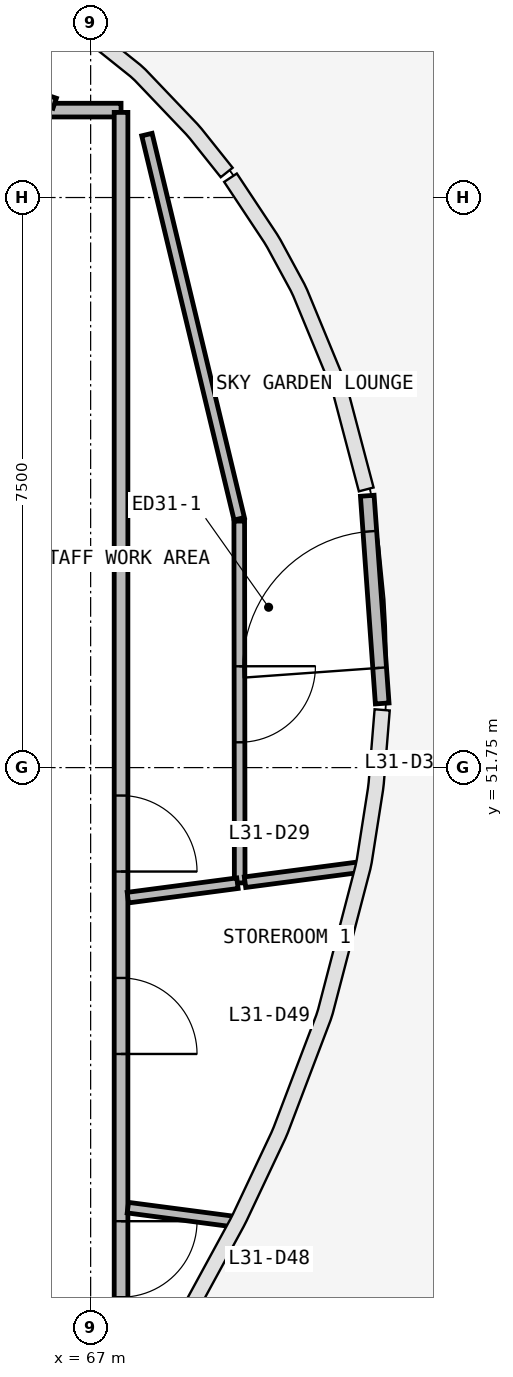
"""IFC4 building model, lengths in metres.
Left out: names, types, materials, properties, quantities, classifications, styles, units other than length and angle.
Written with IfcOpenShell. Run it as: python <this file> out.ifc"""

import sys

from ifc_helpers import new_model, si_unit, direction, frame, frame_2d, origin, place, context, subcontext, project, spatial, rectangle, extrude, source, transform, mapped, element, fill, save


model = new_model("IFC4")
c1 = context("Model", 3, precision=1e-05, world=origin(), true_north=direction((0.0, 1.0)))
c2 = subcontext(c1, "Body", "Model", "MODEL_VIEW")
j1 = project(units=[si_unit("LENGTHUNIT", "METRE"), si_unit("PLANEANGLEUNIT", "RADIAN")], contexts=[c1])
p1 = place(None, origin())
s1 = spatial("IfcSite", under=j1, at=p1, CompositionType="ELEMENT")
p2 = place(p1, origin())
s2 = spatial("IfcBuilding", under=s1, at=p2, CompositionType="ELEMENT")
p3 = place(p2, frame((0.0, 0.0, 133.1)))
s3 = spatial("IfcBuildingStorey", under=s2, at=p3, CompositionType="ELEMENT", Elevation=133.1)
p4 = place(p3, frame((70.836, 52.594, 0.0), z_axis=(0.0, 0.0, 1.0), x_axis=(-0.071747420295, 0.997422832945, 0.0)))
e1 = element("IfcWall", 1, at=p4, inside=s3, PredefinedType="STANDARD", context=c2, shape_type="SweptSolid", body=[
    extrude(rectangle(XDim=2.739, YDim=0.18, at=frame_2d((1.37, 0.0))), origin(), (0.0, 0.0, 1.0), 3.58),
])
p5 = place(p4, frame((0.469, 0.0, 0.0)))
e2 = element("IfcOpeningElement", 2, at=p5, cuts=e1, PredefinedType="OPENING", context=c2, shape_type="SweptSolid", body=[
    extrude(rectangle(XDim=1.8, YDim=2.4, at=frame_2d((0.9, 1.2))), frame((0.0, 0.1, 0.0), z_axis=(0.0, -1.0, 0.0), x_axis=(1.0, 0.0, 0.0)), (0.0, 0.0, 1.0), 0.2),
])
p6 = place(p3, frame((36.6, 60.4, 0.0), z_axis=(0.0, 0.0, 1.0), x_axis=(1.0, 0.0, 0.0)))
e3 = element("IfcWall", 3, at=p6, inside=s3, PredefinedType="PARTITIONING", context=c2, shape_type="SweptSolid", body=[
    extrude(rectangle(XDim=30.8, YDim=0.18, at=frame_2d((15.4, 0.0))), origin(), (0.0, 0.0, 1.0), 2.88),
])
p7 = place(p6, frame((22.25, 0.0, 0.0)))
e4 = element("IfcOpeningElement", 4, at=p7, cuts=e3, PredefinedType="OPENING", context=c2, shape_type="SweptSolid", body=[
    extrude(rectangle(XDim=0.9, YDim=2.1, at=frame_2d((0.45, 1.05))), frame((0.0, 0.1, 0.0), z_axis=(0.0, -1.0, 0.0), x_axis=(1.0, 0.0, 0.0)), (0.0, 0.0, 1.0), 0.2),
])
p8 = place(p6, frame((19.65, 0.0, 0.0)))
e5 = element("IfcOpeningElement", 5, at=p8, cuts=e3, PredefinedType="OPENING", context=c2, shape_type="SweptSolid", body=[
    extrude(rectangle(XDim=0.9, YDim=2.1, at=frame_2d((0.45, 1.05))), frame((0.0, 0.1, 0.0), z_axis=(0.0, -1.0, 0.0), x_axis=(1.0, 0.0, 0.0)), (0.0, 0.0, 1.0), 0.2),
])
p9 = place(p6, frame((17.25, 0.0, 0.0)))
e6 = element("IfcOpeningElement", 6, at=p9, cuts=e3, PredefinedType="OPENING", context=c2, shape_type="SweptSolid", body=[
    extrude(rectangle(XDim=0.9, YDim=2.1, at=frame_2d((0.45, 1.05))), frame((0.0, 0.1, 0.0), z_axis=(0.0, -1.0, 0.0), x_axis=(1.0, 0.0, 0.0)), (0.0, 0.0, 1.0), 0.2),
])
p10 = place(p6, frame((14.95, 0.0, 0.0)))
e7 = element("IfcOpeningElement", 7, at=p10, cuts=e3, PredefinedType="OPENING", context=c2, shape_type="SweptSolid", body=[
    extrude(rectangle(XDim=1.0, YDim=2.1, at=frame_2d((0.5, 1.05))), frame((0.0, 0.1, 0.0), z_axis=(0.0, -1.0, 0.0), x_axis=(1.0, 0.0, 0.0)), (0.0, 0.0, 1.0), 0.2),
])
p11 = place(p6, frame((8.95, 0.0, 0.0)))
e8 = element("IfcOpeningElement", 8, at=p11, cuts=e3, PredefinedType="OPENING", context=c2, shape_type="SweptSolid", body=[
    extrude(rectangle(XDim=1.0, YDim=2.1, at=frame_2d((0.5, 1.05))), frame((0.0, 0.1, 0.0), z_axis=(0.0, -1.0, 0.0), x_axis=(1.0, 0.0, 0.0)), (0.0, 0.0, 1.0), 0.2),
])
p12 = place(p3, frame((67.4, 60.37, 0.0), z_axis=(0.0, 0.0, 1.0), x_axis=(0.0, -1.0, 0.0)))
e9 = element("IfcWall", 9, at=p12, inside=s3, PredefinedType="PARTITIONING", context=c2, shape_type="SweptSolid", body=[
    extrude(rectangle(XDim=23.638, YDim=0.18, at=frame_2d((11.819, 0.0))), origin(), (0.0, 0.0, 1.0), 2.88),
])
p13 = place(p12, frame((8.988, 0.0, 0.0)))
e10 = element("IfcOpeningElement", 10, at=p13, cuts=e9, PredefinedType="OPENING", context=c2, shape_type="SweptSolid", body=[
    extrude(rectangle(XDim=1.0, YDim=2.1, at=frame_2d((0.5, 1.05))), frame((0.0, 0.1, 0.0), z_axis=(0.0, -1.0, 0.0), x_axis=(1.0, 0.0, 0.0)), (0.0, 0.0, 1.0), 0.2),
])
p14 = place(p12, frame((14.587, 0.0, 0.0)))
e11 = element("IfcOpeningElement", 11, at=p14, cuts=e9, PredefinedType="OPENING", context=c2, shape_type="SweptSolid", body=[
    extrude(rectangle(XDim=1.0, YDim=2.1, at=frame_2d((0.5, 1.05))), frame((0.0, 0.1, 0.0), z_axis=(0.0, -1.0, 0.0), x_axis=(1.0, 0.0, 0.0)), (0.0, 0.0, 1.0), 0.2),
])
p15 = place(p12, frame((11.387, 0.0, 0.0)))
e12 = element("IfcOpeningElement", 12, at=p15, cuts=e9, PredefinedType="OPENING", context=c2, shape_type="SweptSolid", body=[
    extrude(rectangle(XDim=1.0, YDim=2.1, at=frame_2d((0.5, 1.05))), frame((0.0, 0.1, 0.0), z_axis=(0.0, -1.0, 0.0), x_axis=(1.0, 0.0, 0.0)), (0.0, 0.0, 1.0), 0.2),
])
p16 = place(p3, frame((68.955, 55.023, 0.0), z_axis=(0.0, 0.0, 1.0), x_axis=(-0.233630483272, 0.97232545852, 0.0)))
e13 = element("IfcWall", 13, at=p16, inside=s3, PredefinedType="PARTITIONING", context=c2, shape_type="SweptSolid", body=[
    extrude(rectangle(XDim=5.199, YDim=0.14, at=frame_2d((2.599, 0.0))), origin(), (0.0, 0.0, 1.0), 2.88),
])
p17 = place(p3, frame((68.955, 54.993, 0.0), z_axis=(0.0, 0.0, 1.0), x_axis=(0.001230894544, -0.999999242449, 0.0)))
e14 = element("IfcWall", 14, at=p17, inside=s3, PredefinedType="PARTITIONING", context=c2, shape_type="SweptSolid", body=[
    extrude(rectangle(XDim=4.76, YDim=0.14, at=frame_2d((2.38, 0.0))), origin(), (0.0, 0.0, 1.0), 2.88),
])
p18 = place(p17, frame((1.91, 0.0, 0.0)))
e15 = element("IfcOpeningElement", 15, at=p18, cuts=e14, PredefinedType="OPENING", context=c2, shape_type="SweptSolid", body=[
    extrude(rectangle(XDim=1.0, YDim=2.1, at=frame_2d((0.5, 1.05))), frame((0.0, 0.08, 0.0), z_axis=(0.0, -1.0, 0.0), x_axis=(1.0, 0.0, 0.0)), (0.0, 0.0, 1.0), 0.16),
])
p19 = place(p3, frame((66.527, 60.49, 0.0), z_axis=(0.0, 0.0, 1.0), x_axis=(-0.946923916586, 0.321457767362, 0.0)))
e16 = element("IfcWall", 16, at=p19, inside=s3, PredefinedType="PARTITIONING", context=c2, shape_type="SweptSolid", body=[
    extrude(rectangle(XDim=4.141, YDim=0.14, at=frame_2d((2.071, 0.0))), origin(), (0.0, 0.0, 1.0), 2.88),
])
p20 = place(p3, frame((69.031, 50.242, 0.0), z_axis=(0.0, 0.0, 1.0), x_axis=(0.991444899248, 0.130525904535, 0.0)))
e17 = element("IfcWall", 17, at=p20, inside=s3, PredefinedType="PARTITIONING", context=c2, shape_type="SweptSolid", body=[
    extrude(rectangle(XDim=1.504, YDim=0.14, at=frame_2d((0.752, 0.0))), origin(), (0.0, 0.0, 1.0), 2.88),
])
p21 = place(p3, frame((67.49, 50.039, 0.0), z_axis=(0.0, 0.0, 1.0), x_axis=(0.991450865751, 0.130480576336, 0.0)))
e18 = element("IfcWall", 18, at=p21, inside=s3, PredefinedType="PARTITIONING", context=c2, shape_type="SweptSolid", body=[
    extrude(rectangle(XDim=1.454, YDim=0.14, at=frame_2d((0.727, 0.0))), origin(), (0.0, 0.0, 1.0), 2.88),
])
p22 = place(p3, frame((67.49, 45.961, 0.0), z_axis=(0.0, 0.0, 1.0), x_axis=(0.991453697095, -0.130459060692, 0.0)))
e19 = element("IfcWall", 19, at=p22, inside=s3, PredefinedType="PARTITIONING", context=c2, shape_type="SweptSolid", body=[
    extrude(rectangle(XDim=1.389, YDim=0.14, at=frame_2d((0.694, 0.0))), origin(), (0.0, 0.0, 1.0), 2.88),
])
m1 = source(origin(), c2, "Body", "SweptSolid", [
    extrude(rectangle(XDim=1.8, YDim=2.4, at=frame_2d((0.9, 1.2))), frame((0.0, 0.025, 0.0), z_axis=(0.0, -1.0, 0.0), x_axis=(1.0, 0.0, 0.0)), (0.0, 0.0, 1.0), 0.05),
])
p23 = place(p5, origin())
e20 = element("IfcDoor", 20, at=p23, inside=s3, OperationType="DOUBLE_DOOR_SINGLE_SWING", PredefinedType="DOOR", context=c2, shape_type="MappedRepresentation", body=[
    mapped(m1, transform((0.0, 0.0, 0.0), scale=1.0)),
])
fill(e2, e20)
m2 = source(origin(), c2, "Body", "SweptSolid", [
    extrude(rectangle(XDim=1.0, YDim=2.1, at=frame_2d((0.5, 1.05))), frame((0.0, 0.025, 0.0), z_axis=(0.0, -1.0, 0.0), x_axis=(1.0, 0.0, 0.0)), (0.0, 0.0, 1.0), 0.05),
])
p24 = place(p13, origin())
e21 = element("IfcDoor", 21, at=p24, inside=s3, OperationType="SINGLE_SWING_RIGHT", PredefinedType="DOOR", context=c2, shape_type="MappedRepresentation", body=[
    mapped(m2, transform((0.0, 0.0, 0.0), scale=1.0)),
])
fill(e10, e21)
p25 = place(p18, origin())
e22 = element("IfcDoor", 22, at=p25, inside=s3, OperationType="SINGLE_SWING_LEFT", PredefinedType="DOOR", context=c2, shape_type="MappedRepresentation", body=[
    mapped(m2, transform((0.0, 0.0, 0.0), scale=1.0)),
])
fill(e15, e22)
p26 = place(p14, origin())
e23 = element("IfcDoor", 23, at=p26, inside=s3, OperationType="SINGLE_SWING_LEFT", PredefinedType="DOOR", context=c2, shape_type="MappedRepresentation", body=[
    mapped(m2, transform((0.0, 0.0, 0.0), scale=1.0)),
])
fill(e11, e23)
p27 = place(p15, origin())
e24 = element("IfcDoor", 24, at=p27, inside=s3, OperationType="SINGLE_SWING_RIGHT", PredefinedType="DOOR", context=c2, shape_type="MappedRepresentation", body=[
    mapped(m2, transform((0.0, 0.0, 0.0), scale=1.0)),
])
fill(e12, e24)
save(model, sys.argv[1])
